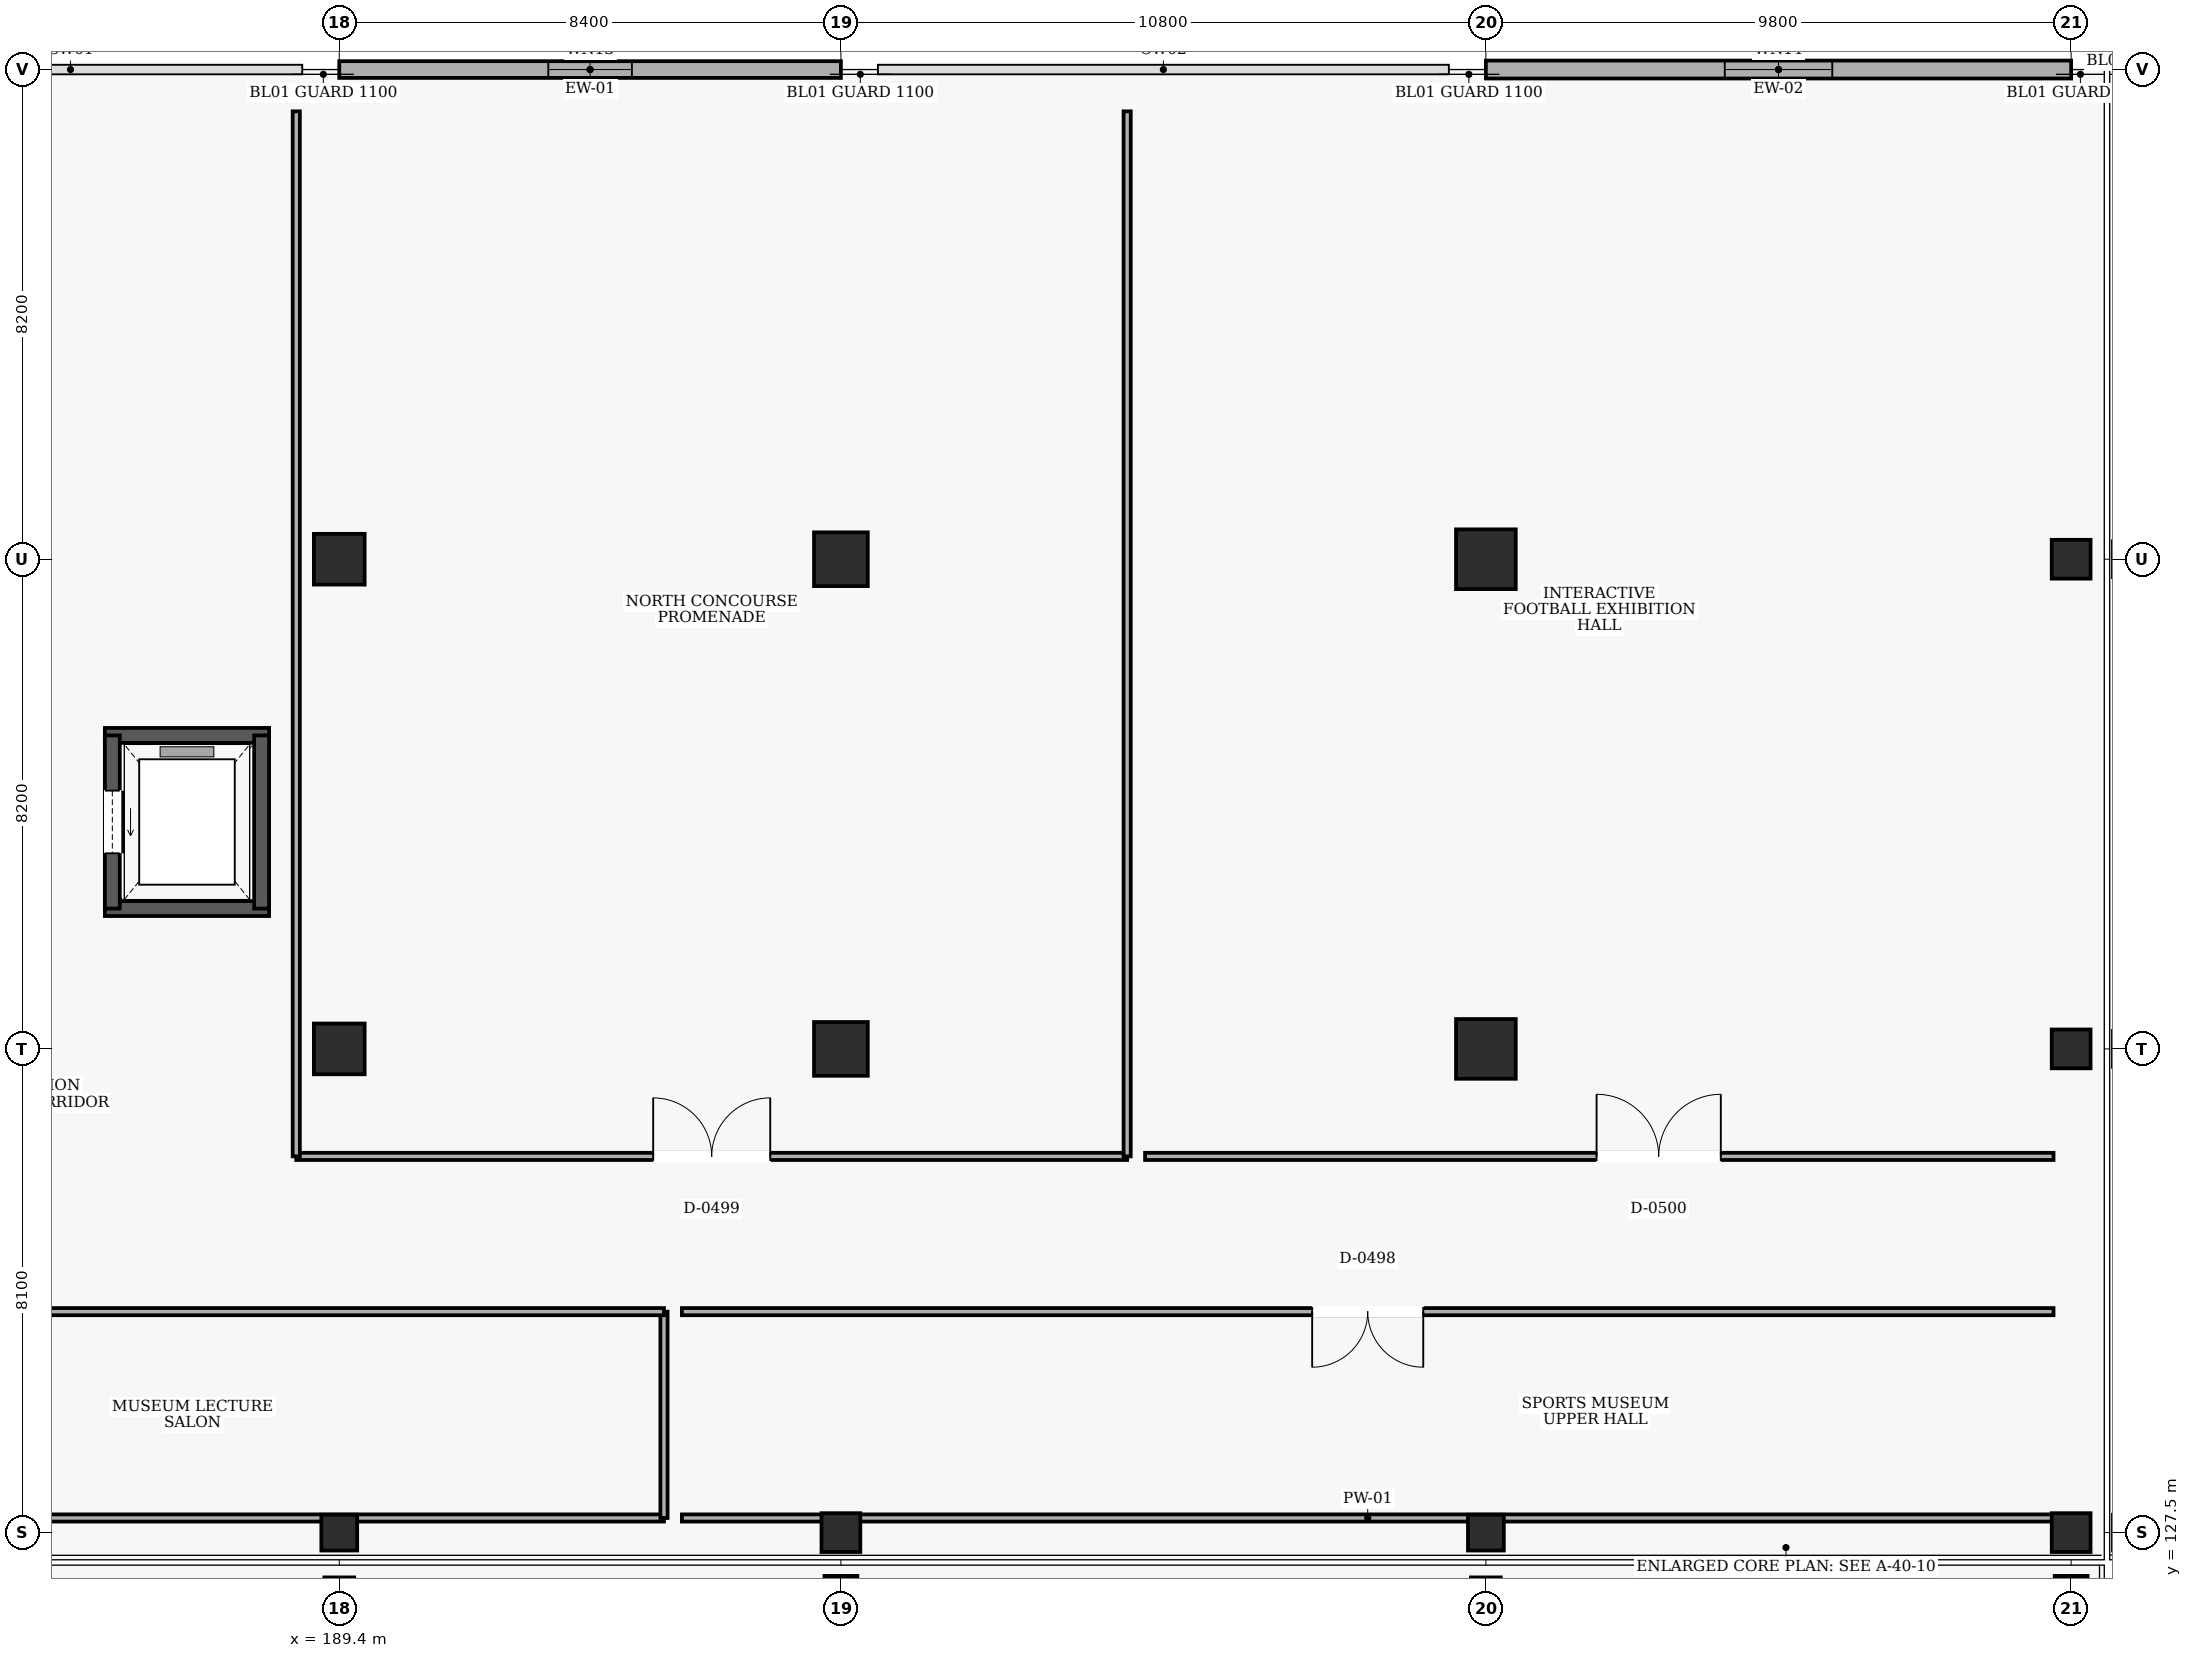
"""IFC4 building model, lengths in metres.
Left out: names, types, materials, properties, quantities, classifications, styles, units other than length and angle.
Written with IfcOpenShell. Run it as: python <this file> out.ifc"""

import sys

from ifc_helpers import new_model, si_unit, direction, frame, frame_2d, origin, origin_2d, place, context, subcontext, project, spatial, rectangle, extrude, element, fill, save


model = new_model("IFC4")
c1 = context("Model", 3, precision=1e-05, world=origin(), true_north=direction((0.0, 1.0)))
c2 = subcontext(c1, "Body", "Model", "MODEL_VIEW")
j1 = project(units=[si_unit("LENGTHUNIT", "METRE"), si_unit("PLANEANGLEUNIT", "RADIAN")], contexts=[c1])
p1 = place(None, origin())
s1 = spatial("IfcSite", under=j1, at=p1, CompositionType="ELEMENT")
p2 = place(p1, origin())
s2 = spatial("IfcBuilding", under=s1, at=p2, CompositionType="ELEMENT")
p3 = place(p2, frame((0.0, 0.0, 5.4)))
s3 = spatial("IfcBuildingStorey", under=s2, at=p3, CompositionType="ELEMENT", Elevation=5.4)
p4 = place(p3, frame((189.4, 126.5, 0.0), z_axis=(0.0, 0.0, 1.0), x_axis=(1.0, 0.0, 0.0)))
e1 = element("IfcColumn", 1, at=p4, inside=s3, PredefinedType="COLUMN", context=c2, shape_type="SweptSolid", body=[
    extrude(rectangle(XDim=0.5, YDim=0.5, at=origin_2d()), origin(), (0.0, 0.0, 1.0), 4.8),
])
p5 = place(p3, frame((189.4, 127.5, 0.0), z_axis=(0.0, 0.0, 1.0), x_axis=(1.0, 0.0, 0.0)))
e2 = element("IfcColumn", 2, at=p5, inside=s3, PredefinedType="COLUMN", context=c2, shape_type="SweptSolid", body=[
    extrude(rectangle(XDim=0.6, YDim=0.6, at=origin_2d()), origin(), (0.0, 0.0, 1.0), 4.8),
])
for number, where, z_axis, x_axis in (
    (3, (189.4, 135.6, 0.0), (0.0, 0.0, 1.0), (1.0, 0.0, 0.0)),
    (4, (189.4, 143.8, 0.0), (0.0, 0.0, 1.0), (1.0, 0.0, 0.0)),
):
    element("IfcColumn", number, at=place(p3, frame(where, z_axis=z_axis, x_axis=x_axis)), inside=s3, PredefinedType="COLUMN", context=c2, shape_type="SweptSolid", body=[
        extrude(rectangle(XDim=0.85, YDim=0.85, at=origin_2d()), origin(), (0.0, 0.0, 1.0), 4.8),
    ])
p6 = place(p3, frame((197.8, 126.5, 0.0), z_axis=(0.0, 0.0, 1.0), x_axis=(1.0, 0.0, 0.0)))
e5 = element("IfcColumn", 5, at=p6, inside=s3, PredefinedType="COLUMN", context=c2, shape_type="SweptSolid", body=[
    extrude(rectangle(XDim=0.55, YDim=0.55, at=origin_2d()), origin(), (0.0, 0.0, 1.0), 4.8),
])
p7 = place(p3, frame((197.8, 127.5, 0.0), z_axis=(0.0, 0.0, 1.0), x_axis=(1.0, 0.0, 0.0)))
e6 = element("IfcColumn", 6, at=p7, inside=s3, PredefinedType="COLUMN", context=c2, shape_type="SweptSolid", body=[
    extrude(rectangle(XDim=0.65, YDim=0.65, at=origin_2d()), origin(), (0.0, 0.0, 1.0), 4.8),
])
for number, where, z_axis, x_axis in (
    (7, (197.8, 135.6, 0.0), (0.0, 0.0, 1.0), (1.0, 0.0, 0.0)),
    (8, (197.8, 143.8, 0.0), (0.0, 0.0, 1.0), (1.0, 0.0, 0.0)),
):
    element("IfcColumn", number, at=place(p3, frame(where, z_axis=z_axis, x_axis=x_axis)), inside=s3, PredefinedType="COLUMN", context=c2, shape_type="SweptSolid", body=[
        extrude(rectangle(XDim=0.9, YDim=0.9, at=origin_2d()), origin(), (0.0, 0.0, 1.0), 4.8),
    ])
p8 = place(p3, frame((208.6, 126.5, 0.0), z_axis=(0.0, 0.0, 1.0), x_axis=(1.0, 0.0, 0.0)))
e9 = element("IfcColumn", 9, at=p8, inside=s3, PredefinedType="COLUMN", context=c2, shape_type="SweptSolid", body=[
    extrude(rectangle(XDim=0.5, YDim=0.5, at=origin_2d()), origin(), (0.0, 0.0, 1.0), 4.8),
])
p9 = place(p3, frame((208.6, 127.5, 0.0), z_axis=(0.0, 0.0, 1.0), x_axis=(1.0, 0.0, 0.0)))
e10 = element("IfcColumn", 10, at=p9, inside=s3, PredefinedType="COLUMN", context=c2, shape_type="SweptSolid", body=[
    extrude(rectangle(XDim=0.6, YDim=0.6, at=origin_2d()), origin(), (0.0, 0.0, 1.0), 4.8),
])
for number, where, z_axis, x_axis in (
    (11, (208.6, 135.6, 0.0), (0.0, 0.0, 1.0), (1.0, 0.0, 0.0)),
    (12, (208.6, 143.8, 0.0), (0.0, 0.0, 1.0), (1.0, 0.0, 0.0)),
):
    element("IfcColumn", number, at=place(p3, frame(where, z_axis=z_axis, x_axis=x_axis)), inside=s3, PredefinedType="COLUMN", context=c2, shape_type="SweptSolid", body=[
        extrude(rectangle(XDim=1.0, YDim=1.0, at=origin_2d()), origin(), (0.0, 0.0, 1.0), 4.8),
    ])
p10 = place(p3, frame((218.4, 126.5, 0.0), z_axis=(0.0, 0.0, 1.0), x_axis=(1.0, 0.0, 0.0)))
e13 = element("IfcColumn", 13, at=p10, inside=s3, PredefinedType="COLUMN", context=c2, shape_type="SweptSolid", body=[
    extrude(rectangle(XDim=0.55, YDim=0.55, at=origin_2d()), origin(), (0.0, 0.0, 1.0), 4.8),
])
for number, where, z_axis, x_axis in (
    (14, (218.4, 127.5, 0.0), (0.0, 0.0, 1.0), (1.0, 0.0, 0.0)),
    (15, (218.4, 135.6, 0.0), (0.0, 0.0, 1.0), (1.0, 0.0, 0.0)),
    (16, (218.4, 143.8, 0.0), (0.0, 0.0, 1.0), (1.0, 0.0, 0.0)),
):
    element("IfcColumn", number, at=place(p3, frame(where, z_axis=z_axis, x_axis=x_axis)), inside=s3, PredefinedType="COLUMN", context=c2, shape_type="SweptSolid", body=[
        extrude(rectangle(XDim=0.65, YDim=0.65, at=origin_2d()), origin(), (0.0, 0.0, 1.0), 4.8),
    ])
for number, where, z_axis, x_axis in (
    (17, (219.4, 127.5, 0.0), (0.0, 0.0, 1.0), (1.0, 0.0, 0.0)),
    (18, (219.4, 135.6, 0.0), (0.0, 0.0, 1.0), (1.0, 0.0, 0.0)),
    (19, (219.4, 143.8, 0.0), (0.0, 0.0, 1.0), (1.0, 0.0, 0.0)),
):
    element("IfcColumn", number, at=place(p3, frame(where, z_axis=z_axis, x_axis=x_axis)), inside=s3, PredefinedType="COLUMN", context=c2, shape_type="SweptSolid", body=[
        extrude(rectangle(XDim=0.6, YDim=0.6, at=origin_2d()), origin(), (0.0, 0.0, 1.0), 4.8),
    ])
p11 = place(p3, frame((189.4, 152.0, 0.0), z_axis=(0.0, 0.0, 1.0), x_axis=(1.0, 0.0, 0.0)))
e20 = element("IfcWall", 20, at=p11, inside=s3, PredefinedType="SOLIDWALL", context=c2, shape_type="SweptSolid", body=[
    extrude(rectangle(XDim=8.4, YDim=0.28, at=frame_2d((4.2, 0.0))), origin(), (0.0, 0.0, 1.0), 4.48),
])
p12 = place(p11, frame((3.5, 0.0, 0.9)))
e21 = element("IfcOpeningElement", 21, at=p12, cuts=e20, PredefinedType="OPENING", context=c2, shape_type="SweptSolid", body=[
    extrude(rectangle(XDim=1.4, YDim=2.1, at=frame_2d((0.7, 1.05))), frame((0.0, 0.15, 0.0), z_axis=(0.0, -1.0, 0.0), x_axis=(1.0, 0.0, 0.0)), (0.0, 0.0, 1.0), 0.3),
])
p13 = place(p3, frame((208.6, 152.0, 0.0), z_axis=(0.0, 0.0, 1.0), x_axis=(1.0, 0.0, 0.0)))
e22 = element("IfcWall", 22, at=p13, inside=s3, PredefinedType="SOLIDWALL", context=c2, shape_type="SweptSolid", body=[
    extrude(rectangle(XDim=9.8, YDim=0.3, at=frame_2d((4.9, 0.0))), origin(), (0.0, 0.0, 1.0), 4.48),
])
p14 = place(p13, frame((4.0, 0.0, 0.9)))
e23 = element("IfcOpeningElement", 23, at=p14, cuts=e22, PredefinedType="OPENING", context=c2, shape_type="SweptSolid", body=[
    extrude(rectangle(XDim=1.8, YDim=2.1, at=frame_2d((0.9, 1.05))), frame((0.0, 0.16, 0.0), z_axis=(0.0, -1.0, 0.0), x_axis=(1.0, 0.0, 0.0)), (0.0, 0.0, 1.0), 0.32),
])
for number, where, z_axis, x_axis in (
    (24, (185.475, 137.95, 0.0), (0.0, 0.0, 1.0), (1.0, 0.0, 0.0)),
    (25, (188.225, 140.85, 0.0), (0.0, 0.0, 1.0), (-1.0, 0.0, 0.0)),
):
    element("IfcWall", number, at=place(p3, frame(where, z_axis=z_axis, x_axis=x_axis)), inside=s3, PredefinedType="SHEAR", context=c2, shape_type="SweptSolid", body=[
        extrude(rectangle(XDim=2.75, YDim=0.25, at=frame_2d((1.375, 0.0))), origin(), (0.0, 0.0, 1.0), 4.5),
    ])
p15 = place(p3, frame((185.6, 140.85, 0.0), z_axis=(0.0, 0.0, 1.0), x_axis=(0.0, -1.0, 0.0)))
e26 = element("IfcWall", 26, at=p15, inside=s3, PredefinedType="SHEAR", context=c2, shape_type="SweptSolid", body=[
    extrude(rectangle(XDim=2.9, YDim=0.25, at=frame_2d((1.45, 0.0))), origin(), (0.0, 0.0, 1.0), 4.5),
])
p16 = place(p15, frame((0.925, 0.0, 0.0)))
e27 = element("IfcOpeningElement", 27, at=p16, cuts=e26, PredefinedType="OPENING", context=c2, shape_type="SweptSolid", body=[
    extrude(rectangle(XDim=1.05, YDim=2.15, at=frame_2d((0.525, 1.075))), frame((0.0, 0.135, 0.0), z_axis=(0.0, -1.0, 0.0), x_axis=(1.0, 0.0, 0.0)), (0.0, 0.0, 1.0), 0.27),
])
p17 = place(p3, frame((188.1, 137.95, 0.0), z_axis=(0.0, 0.0, 1.0), x_axis=(0.0, 1.0, 0.0)))
e28 = element("IfcWall", 28, at=p17, inside=s3, PredefinedType="SHEAR", context=c2, shape_type="SweptSolid", body=[
    extrude(rectangle(XDim=2.9, YDim=0.25, at=frame_2d((1.45, 0.0))), origin(), (0.0, 0.0, 1.0), 4.5),
])
p18 = place(p3, frame((171.87, 127.745, 0.0), z_axis=(0.0, 0.0, 1.0), x_axis=(1.0, 0.0, 0.0)))
e29 = element("IfcWall", 29, at=p18, inside=s3, PredefinedType="PARTITIONING", context=c2, shape_type="SweptSolid", body=[
    extrude(rectangle(XDim=22.967, YDim=0.12, at=frame_2d((11.484, 0.0))), origin(), (0.0, 0.0, 1.0), 3.53),
])
p19 = place(p3, frame((194.837, 127.745, 0.0), z_axis=(0.0, 0.0, 1.0), x_axis=(0.0, 1.0, 0.0)))
e30 = element("IfcWall", 30, at=p19, inside=s3, PredefinedType="PARTITIONING", context=c2, shape_type="SweptSolid", body=[
    extrude(rectangle(XDim=3.455, YDim=0.12, at=frame_2d((1.728, 0.0))), origin(), (0.0, 0.0, 1.0), 4.5),
])
p20 = place(p3, frame((194.837, 131.2, 0.0), z_axis=(0.0, 0.0, 1.0), x_axis=(-1.0, 0.0, 0.0)))
e31 = element("IfcWall", 31, at=p20, inside=s3, PredefinedType="PARTITIONING", context=c2, shape_type="SweptSolid", body=[
    extrude(rectangle(XDim=22.967, YDim=0.12, at=frame_2d((11.484, 0.0))), origin(), (0.0, 0.0, 1.0), 4.5),
])
p21 = place(p20, frame((10.604, 0.0, 0.0)))
e32 = element("IfcOpeningElement", 32, at=p21, cuts=e31, PredefinedType="OPENING", context=c2, shape_type="SweptSolid", body=[
    extrude(rectangle(XDim=1.76, YDim=2.25, at=frame_2d((0.88, 1.125))), frame((0.0, 0.07, 0.0), z_axis=(0.0, -1.0, 0.0), x_axis=(1.0, 0.0, 0.0)), (0.0, 0.0, 1.0), 0.14),
])
p22 = place(p3, frame((195.137, 127.745, 0.0), z_axis=(0.0, 0.0, 1.0), x_axis=(1.0, 0.0, 0.0)))
e33 = element("IfcWall", 33, at=p22, inside=s3, PredefinedType="PARTITIONING", context=c2, shape_type="SweptSolid", body=[
    extrude(rectangle(XDim=22.968, YDim=0.12, at=frame_2d((11.484, 0.0))), origin(), (0.0, 0.0, 1.0), 3.58),
])
p23 = place(p3, frame((218.105, 131.2, 0.0), z_axis=(0.0, 0.0, 1.0), x_axis=(-1.0, 0.0, 0.0)))
e34 = element("IfcWall", 34, at=p23, inside=s3, PredefinedType="PARTITIONING", context=c2, shape_type="SweptSolid", body=[
    extrude(rectangle(XDim=22.968, YDim=0.12, at=frame_2d((11.484, 0.0))), origin(), (0.0, 0.0, 1.0), 4.5),
])
p24 = place(p23, frame((10.554, 0.0, 0.0)))
e35 = element("IfcOpeningElement", 35, at=p24, cuts=e34, PredefinedType="OPENING", context=c2, shape_type="SweptSolid", body=[
    extrude(rectangle(XDim=1.86, YDim=2.3, at=frame_2d((0.93, 1.15))), frame((0.0, 0.07, 0.0), z_axis=(0.0, -1.0, 0.0), x_axis=(1.0, 0.0, 0.0)), (0.0, 0.0, 1.0), 0.14),
])
p25 = place(p3, frame((188.68, 133.8, 0.0), z_axis=(0.0, 0.0, 1.0), x_axis=(1.0, 0.0, 0.0)))
e36 = element("IfcWall", 36, at=p25, inside=s3, PredefinedType="PARTITIONING", context=c2, shape_type="SweptSolid", body=[
    extrude(rectangle(XDim=13.913, YDim=0.12, at=frame_2d((6.957, 0.0))), origin(), (0.0, 0.0, 1.0), 4.5),
])
p26 = place(p25, frame((5.977, 0.0, 0.0)))
e37 = element("IfcOpeningElement", 37, at=p26, cuts=e36, PredefinedType="OPENING", context=c2, shape_type="SweptSolid", body=[
    extrude(rectangle(XDim=1.96, YDim=2.3, at=frame_2d((0.98, 1.15))), frame((0.0, 0.07, 0.0), z_axis=(0.0, -1.0, 0.0), x_axis=(1.0, 0.0, 0.0)), (0.0, 0.0, 1.0), 0.14),
])
for number, where, z_axis, x_axis in (
    (38, (202.593, 133.8, 0.0), (0.0, 0.0, 1.0), (0.0, 1.0, 0.0)),
    (39, (188.68, 151.3, 0.0), (0.0, 0.0, 1.0), (0.0, -1.0, 0.0)),
):
    element("IfcWall", number, at=place(p3, frame(where, z_axis=z_axis, x_axis=x_axis)), inside=s3, PredefinedType="PARTITIONING", context=c2, shape_type="SweptSolid", body=[
        extrude(rectangle(XDim=17.5, YDim=0.12, at=frame_2d((8.75, 0.0))), origin(), (0.0, 0.0, 1.0), 4.5),
    ])
p27 = place(p3, frame((202.893, 133.8, 0.0), z_axis=(0.0, 0.0, 1.0), x_axis=(1.0, 0.0, 0.0)))
e40 = element("IfcWall", 40, at=p27, inside=s3, PredefinedType="PARTITIONING", context=c2, shape_type="SweptSolid", body=[
    extrude(rectangle(XDim=15.212, YDim=0.12, at=frame_2d((7.606, 0.0))), origin(), (0.0, 0.0, 1.0), 4.5),
])
p28 = place(p27, frame((7.56, 0.0, 0.0)))
e41 = element("IfcOpeningElement", 41, at=p28, cuts=e40, PredefinedType="OPENING", context=c2, shape_type="SweptSolid", body=[
    extrude(rectangle(XDim=2.08, YDim=2.35, at=frame_2d((1.04, 1.175))), frame((0.0, 0.07, 0.0), z_axis=(0.0, -1.0, 0.0), x_axis=(1.0, 0.0, 0.0)), (0.0, 0.0, 1.0), 0.14),
])
p29 = place(p12, origin())
e42 = element("IfcWindow", 42, at=p29, inside=s3, PartitioningType="SINGLE_PANEL", PredefinedType="WINDOW", context=c2, shape_type="SweptSolid", body=[
    extrude(rectangle(XDim=1.4, YDim=2.1, at=frame_2d((0.7, 1.05))), frame((0.0, 0.03, 0.0), z_axis=(0.0, -1.0, 0.0), x_axis=(1.0, 0.0, 0.0)), (0.0, 0.0, 1.0), 0.06),
])
fill(e21, e42)
p30 = place(p14, origin())
e43 = element("IfcWindow", 43, at=p30, inside=s3, PartitioningType="SINGLE_PANEL", PredefinedType="WINDOW", context=c2, shape_type="SweptSolid", body=[
    extrude(rectangle(XDim=1.8, YDim=2.1, at=frame_2d((0.9, 1.05))), frame((0.0, 0.03, 0.0), z_axis=(0.0, -1.0, 0.0), x_axis=(1.0, 0.0, 0.0)), (0.0, 0.0, 1.0), 0.06),
])
fill(e23, e43)
p31 = place(p16, origin())
e44 = element("IfcDoor", 44, at=p31, inside=s3, OperationType="SLIDING_TO_LEFT", PredefinedType="DOOR", context=c2, shape_type="SweptSolid", body=[
    extrude(rectangle(XDim=1.05, YDim=2.15, at=frame_2d((0.525, 1.075))), frame((0.0, 0.025, 0.0), z_axis=(0.0, -1.0, 0.0), x_axis=(1.0, 0.0, 0.0)), (0.0, 0.0, 1.0), 0.05),
])
fill(e27, e44)
p32 = place(p24, origin())
e45 = element("IfcDoor", 45, at=p32, inside=s3, OperationType="DOUBLE_DOOR_SINGLE_SWING", PredefinedType="DOOR", context=c2, shape_type="SweptSolid", body=[
    extrude(rectangle(XDim=1.86, YDim=2.3, at=frame_2d((0.93, 1.15))), frame((0.0, 0.025, 0.0), z_axis=(0.0, -1.0, 0.0), x_axis=(1.0, 0.0, 0.0)), (0.0, 0.0, 1.0), 0.05),
])
fill(e35, e45)
p33 = place(p26, origin())
e46 = element("IfcDoor", 46, at=p33, inside=s3, OperationType="DOUBLE_DOOR_SINGLE_SWING", PredefinedType="DOOR", context=c2, shape_type="SweptSolid", body=[
    extrude(rectangle(XDim=1.96, YDim=2.3, at=frame_2d((0.98, 1.15))), frame((0.0, 0.025, 0.0), z_axis=(0.0, -1.0, 0.0), x_axis=(1.0, 0.0, 0.0)), (0.0, 0.0, 1.0), 0.05),
])
fill(e37, e46)
p34 = place(p28, origin())
e47 = element("IfcDoor", 47, at=p34, inside=s3, OperationType="DOUBLE_DOOR_SINGLE_SWING", PredefinedType="DOOR", context=c2, shape_type="SweptSolid", body=[
    extrude(rectangle(XDim=2.08, YDim=2.35, at=frame_2d((1.04, 1.175))), frame((0.0, 0.025, 0.0), z_axis=(0.0, -1.0, 0.0), x_axis=(1.0, 0.0, 0.0)), (0.0, 0.0, 1.0), 0.05),
])
fill(e41, e47)
save(model, sys.argv[1])
